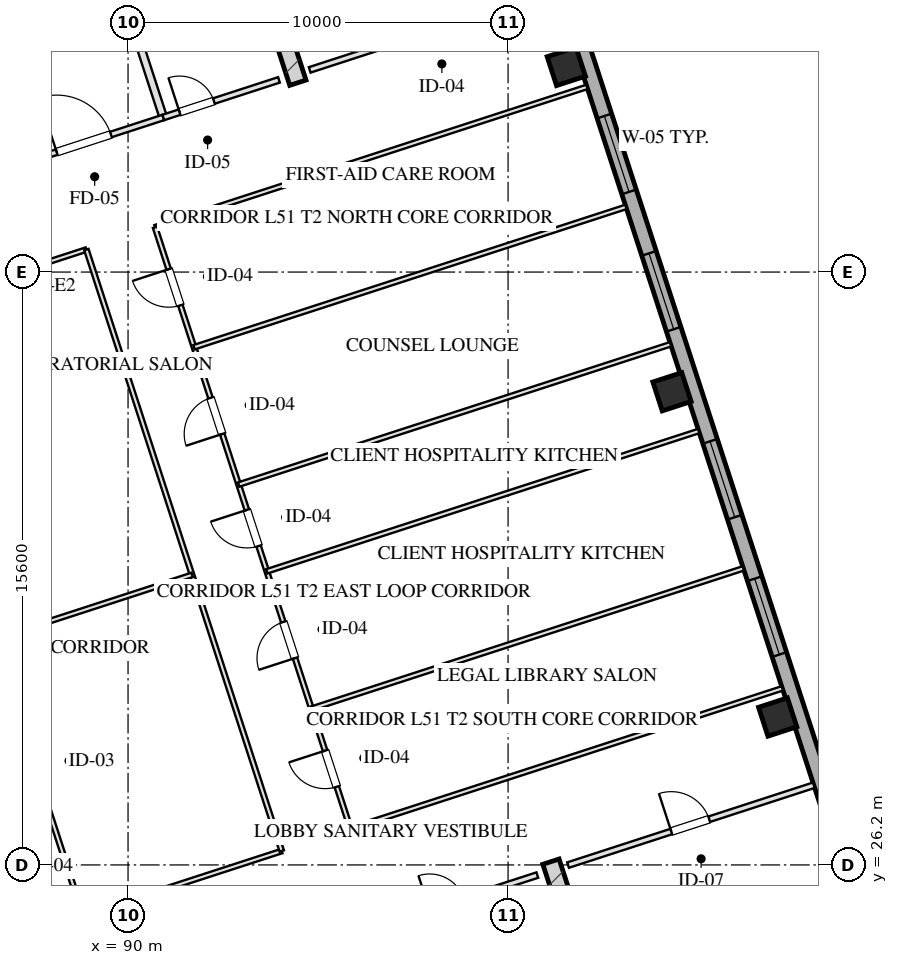
"""IFC4 building model, lengths in metres.
Left out: names, types, materials, properties, quantities, classifications, styles, units other than length and angle.
Written with IfcOpenShell. Run it as: python <this file> out.ifc"""

import sys

from ifc_helpers import new_model, si_unit, direction, frame, frame_2d, origin, origin_2d, place, context, subcontext, project, spatial, rectangle, hollow_rectangle, extrude, element, fill, save


model = new_model("IFC4")
c1 = context("Model", 3, precision=1e-05, world=origin(), true_north=direction((0.0, 1.0)))
c2 = subcontext(c1, "Body", "Model", "MODEL_VIEW")
j1 = project(units=[si_unit("LENGTHUNIT", "METRE"), si_unit("PLANEANGLEUNIT", "RADIAN")], contexts=[c1])
p1 = place(None, origin())
s1 = spatial("IfcSite", under=j1, at=p1, CompositionType="ELEMENT")
p2 = place(p1, origin())
s2 = spatial("IfcBuilding", under=s1, at=p2, CompositionType="ELEMENT")
p3 = place(p2, frame((0.0, 0.0, 192.05)))
s3 = spatial("IfcBuildingStorey", under=s2, at=p3, CompositionType="ELEMENT", Elevation=192.05)
for number, where, z_axis, x_axis in (
    (1, (101.128, 26.286, 0.0), (0.0, 0.0, 1.0), (0.309, -0.951, 0.0)),
    (2, (94.469, 46.781, 0.0), (0.0, 0.0, 1.0), (-0.309, 0.951, 0.0)),
):
    element("IfcWall", number, at=place(p3, frame(where, z_axis=z_axis, x_axis=x_axis)), inside=s3, PredefinedType="SHEAR", context=c2, shape_type="SweptSolid", body=[
        extrude(rectangle(XDim=9.33, YDim=0.45, at=frame_2d((4.665, 0.0))), origin(), (0.0, 0.0, 1.0), 3.45),
    ])
for number, where, z_axis, x_axis in (
    (3, (107.094, 30.091, 0.0), (0.0, 0.0, 1.0), (0.951, 0.309, 0.0)),
    (4, (104.313, 38.651, 0.0), (0.0, 0.0, 1.0), (0.951, 0.309, 0.0)),
    (5, (101.532, 47.21, 0.0), (0.0, 0.0, 1.0), (0.951, 0.309, 0.0)),
):
    element("IfcColumn", number, at=place(p3, frame(where, z_axis=z_axis, x_axis=x_axis)), inside=s3, PredefinedType="COLUMN", context=c2, shape_type="SweptSolid", body=[
        extrude(hollow_rectangle(XDim=0.8, YDim=0.8, WallThickness=0.028, at=origin_2d()), origin(), (0.0, 0.0, 1.0), 3.451),
    ])
p4 = place(p3, frame((98.224, 59.173, 0.0), z_axis=(0.0, 0.0, 1.0), x_axis=(0.309014228706, -0.951057414911, 0.0)))
e6 = element("IfcWall", 6, at=p4, inside=s3, PredefinedType="SOLIDWALL", context=c2, shape_type="SweptSolid", body=[
    extrude(rectangle(XDim=42.8, YDim=0.4, at=frame_2d((21.4, 0.0))), origin(), (0.0, 0.0, 1.0), 2.61),
])
p5 = place(p4, frame((26.75, 0.0, 0.75)))
e7 = element("IfcOpeningElement", 7, at=p5, cuts=e6, PredefinedType="OPENING", context=c2, shape_type="SweptSolid", body=[
    extrude(rectangle(XDim=2.1, YDim=1.46, at=frame_2d((1.05, 0.73))), frame((0.0, 0.21, 0.0), z_axis=(0.0, -1.0, 0.0), x_axis=(1.0, 0.0, 0.0)), (0.0, 0.0, 1.0), 0.42),
])
p6 = place(p4, frame((22.95, 0.0, 0.75)))
e8 = element("IfcOpeningElement", 8, at=p6, cuts=e6, PredefinedType="OPENING", context=c2, shape_type="SweptSolid", body=[
    extrude(rectangle(XDim=2.1, YDim=1.46, at=frame_2d((1.05, 0.73))), frame((0.0, 0.21, 0.0), z_axis=(0.0, -1.0, 0.0), x_axis=(1.0, 0.0, 0.0)), (0.0, 0.0, 1.0), 0.42),
])
p7 = place(p4, frame((17.75, 0.0, 0.75)))
e9 = element("IfcOpeningElement", 9, at=p7, cuts=e6, PredefinedType="OPENING", context=c2, shape_type="SweptSolid", body=[
    extrude(rectangle(XDim=2.1, YDim=1.46, at=frame_2d((1.05, 0.73))), frame((0.0, 0.21, 0.0), z_axis=(0.0, -1.0, 0.0), x_axis=(1.0, 0.0, 0.0)), (0.0, 0.0, 1.0), 0.42),
])
p8 = place(p4, frame((13.95, 0.0, 0.75)))
e10 = element("IfcOpeningElement", 10, at=p8, cuts=e6, PredefinedType="OPENING", context=c2, shape_type="SweptSolid", body=[
    extrude(rectangle(XDim=2.1, YDim=1.46, at=frame_2d((1.05, 0.73))), frame((0.0, 0.21, 0.0), z_axis=(0.0, -1.0, 0.0), x_axis=(1.0, 0.0, 0.0)), (0.0, 0.0, 1.0), 0.42),
])
p9 = place(p3, frame((97.727, 24.944, 0.0), z_axis=(0.0, 0.0, 1.0), x_axis=(0.951036872128, 0.309077446369, 0.0)))
e11 = element("IfcWall", 11, at=p9, inside=s3, PredefinedType="PARTITIONING", context=c2, shape_type="SweptSolid", body=[
    extrude(rectangle(XDim=3.2, YDim=0.15, at=frame_2d((1.6, 0.0))), origin(), (0.0, 0.0, 1.0), 3.175),
])
p10 = place(p9, frame((0.22, 0.0, 0.0)))
e12 = element("IfcOpeningElement", 12, at=p10, cuts=e11, PredefinedType="OPENING", context=c2, shape_type="SweptSolid", body=[
    extrude(rectangle(XDim=0.95, YDim=2.05, at=frame_2d((0.475, 1.025))), frame((0.0, 0.085, 0.0), z_axis=(0.0, -1.0, 0.0), x_axis=(1.0, 0.0, 0.0)), (0.0, 0.0, 1.0), 0.17),
])
p11 = place(p3, frame((90.928, 45.868, 0.0), z_axis=(0.0, 0.0, 1.0), x_axis=(-0.309042196757, 0.951048327176, 0.0)))
e13 = element("IfcWall", 13, at=p11, inside=s3, PredefinedType="PARTITIONING", context=c2, shape_type="SweptSolid", body=[
    extrude(rectangle(XDim=8.43, YDim=0.2, at=frame_2d((4.215, 0.0))), origin(), (0.0, 0.0, 1.0), 3.175),
])
p12 = place(p3, frame((86.743, 44.508, 0.0), z_axis=(0.0, 0.0, 1.0), x_axis=(0.951063829732, 0.308994485023, 0.0)))
e14 = element("IfcWall", 14, at=p12, inside=s3, PredefinedType="PARTITIONING", context=c2, shape_type="SweptSolid", body=[
    extrude(rectangle(XDim=4.4, YDim=0.15, at=frame_2d((2.2, 0.0))), origin(), (0.0, 0.0, 1.0), 3.175),
])
p13 = place(p12, frame((1.45, 0.0, 0.0)))
e15 = element("IfcOpeningElement", 15, at=p13, cuts=e14, PredefinedType="OPENING", context=c2, shape_type="SweptSolid", body=[
    extrude(rectangle(XDim=1.5, YDim=2.05, at=frame_2d((0.75, 1.025))), frame((0.0, 0.085, 0.0), z_axis=(0.0, -1.0, 0.0), x_axis=(1.0, 0.0, 0.0)), (0.0, 0.0, 1.0), 0.17),
])
p14 = place(p3, frame((85.718, 47.666, 0.0), z_axis=(0.0, 0.0, 1.0), x_axis=(0.951058531764, 0.30901079133, 0.0)))
e16 = element("IfcWall", 16, at=p14, inside=s3, PredefinedType="PARTITIONING", context=c2, shape_type="SweptSolid", body=[
    extrude(rectangle(XDim=4.4, YDim=0.2, at=frame_2d((2.2, 0.0))), origin(), (0.0, 0.0, 1.0), 3.175),
])
p15 = place(p14, frame((0.45, 0.0, 0.0)))
e17 = element("IfcOpeningElement", 17, at=p15, cuts=e16, PredefinedType="OPENING", context=c2, shape_type="SweptSolid", body=[
    extrude(rectangle(XDim=1.1, YDim=2.05, at=frame_2d((0.55, 1.025))), frame((0.0, 0.11, 0.0), z_axis=(0.0, -1.0, 0.0), x_axis=(1.0, 0.0, 0.0)), (0.0, 0.0, 1.0), 0.22),
])
p16 = place(p14, frame((2.55, 0.0, 0.0)))
e18 = element("IfcOpeningElement", 18, at=p16, cuts=e16, PredefinedType="OPENING", context=c2, shape_type="SweptSolid", body=[
    extrude(rectangle(XDim=1.1, YDim=2.05, at=frame_2d((0.55, 1.025))), frame((0.0, 0.11, 0.0), z_axis=(0.0, -1.0, 0.0), x_axis=(1.0, 0.0, 0.0)), (0.0, 0.0, 1.0), 0.22),
])
p17 = place(p3, frame((90.928, 45.868, 0.0), z_axis=(0.0, 0.0, 1.0), x_axis=(0.951059297078, 0.309008435874, 0.0)))
e19 = element("IfcWall", 19, at=p17, inside=s3, PredefinedType="PARTITIONING", context=c2, shape_type="SweptSolid", body=[
    extrude(rectangle(XDim=3.2, YDim=0.15, at=frame_2d((1.6, 0.0))), origin(), (0.0, 0.0, 1.0), 3.175),
])
p18 = place(p17, frame((0.45, 0.0, 0.0)))
e20 = element("IfcOpeningElement", 20, at=p18, cuts=e19, PredefinedType="OPENING", context=c2, shape_type="SweptSolid", body=[
    extrude(rectangle(XDim=0.95, YDim=2.05, at=frame_2d((0.475, 1.025))), frame((0.0, 0.085, 0.0), z_axis=(0.0, -1.0, 0.0), x_axis=(1.0, 0.0, 0.0)), (0.0, 0.0, 1.0), 0.17),
])
p19 = place(p3, frame((101.578, 26.196, 0.0), z_axis=(0.0, 0.0, 1.0), x_axis=(0.951064934653, 0.308991084134, 0.0)))
e21 = element("IfcWall", 21, at=p19, inside=s3, PredefinedType="PARTITIONING", context=c2, shape_type="SweptSolid", body=[
    extrude(rectangle(XDim=6.8, YDim=0.15, at=frame_2d((3.4, 0.0))), origin(), (0.0, 0.0, 1.0), 3.175),
])
p20 = place(p19, frame((2.856, 0.0, 0.0)))
e22 = element("IfcOpeningElement", 22, at=p20, cuts=e21, PredefinedType="OPENING", context=c2, shape_type="SweptSolid", body=[
    extrude(rectangle(XDim=1.05, YDim=2.05, at=frame_2d((0.525, 1.025))), frame((0.0, 0.085, 0.0), z_axis=(0.0, -1.0, 0.0), x_axis=(1.0, 0.0, 0.0)), (0.0, 0.0, 1.0), 0.17),
])
p21 = place(p3, frame((94.78, 47.119, 0.0), z_axis=(0.0, 0.0, 1.0), x_axis=(0.951057811516, 0.309013008068, 0.0)))
e23 = element("IfcWall", 23, at=p21, inside=s3, PredefinedType="PARTITIONING", context=c2, shape_type="SweptSolid", body=[
    extrude(rectangle(XDim=6.8, YDim=0.15, at=frame_2d((3.4, 0.0))), origin(), (0.0, 0.0, 1.0), 3.175),
])
p22 = place(p21, frame((2.856, 0.0, 0.0)))
e24 = element("IfcOpeningElement", 24, at=p22, cuts=e23, PredefinedType="OPENING", context=c2, shape_type="SweptSolid", body=[
    extrude(rectangle(XDim=1.0, YDim=2.05, at=frame_2d((0.5, 1.025))), frame((0.0, 0.085, 0.0), z_axis=(0.0, -1.0, 0.0), x_axis=(1.0, 0.0, 0.0)), (0.0, 0.0, 1.0), 0.17),
])
p23 = place(p3, frame((88.814, 24.867, 0.0), z_axis=(0.0, 0.0, 1.0), x_axis=(0.951061793147, 0.309000753423, 0.0)))
e25 = element("IfcWall", 25, at=p23, inside=s3, PredefinedType="PARTITIONING", context=c2, shape_type="SweptSolid", body=[
    extrude(rectangle(XDim=5.5, YDim=0.12, at=frame_2d((2.75, 0.0))), origin(), (0.0, 0.0, 1.0), 3.175),
])
p24 = place(p3, frame((95.852, 27.153, 0.0), z_axis=(0.0, 0.0, 1.0), x_axis=(0.951054485045, 0.30902324585, 0.0)))
e26 = element("IfcWall", 26, at=p24, inside=s3, PredefinedType="PARTITIONING", context=c2, shape_type="SweptSolid", body=[
    extrude(rectangle(XDim=11.95, YDim=0.12, at=frame_2d((5.975, 0.0))), origin(), (0.0, 0.0, 1.0), 3.175),
])
p25 = place(p3, frame((83.672, 40.692, 0.0), z_axis=(0.0, 0.0, 1.0), x_axis=(0.951048747115, 0.30904090443, 0.0)))
e27 = element("IfcWall", 27, at=p25, inside=s3, PredefinedType="PARTITIONING", context=c2, shape_type="SweptSolid", body=[
    extrude(rectangle(XDim=5.5, YDim=0.12, at=frame_2d((2.75, 0.0))), origin(), (0.0, 0.0, 1.0), 3.175),
])
p26 = place(p3, frame((90.71, 42.979, 0.0), z_axis=(0.0, 0.0, 1.0), x_axis=(0.95105853842, 0.309010770845, 0.0)))
e28 = element("IfcWall", 28, at=p26, inside=s3, PredefinedType="PARTITIONING", context=c2, shape_type="SweptSolid", body=[
    extrude(rectangle(XDim=11.95, YDim=0.12, at=frame_2d((5.975, 0.0))), origin(), (0.0, 0.0, 1.0), 3.175),
])
p27 = place(p3, frame((88.814, 24.867, 0.0), z_axis=(0.0, 0.0, 1.0), x_axis=(-0.309022042254, 0.951054876125, 0.0)))
e29 = element("IfcWall", 29, at=p27, inside=s3, PredefinedType="PARTITIONING", context=c2, shape_type="SweptSolid", body=[
    extrude(rectangle(XDim=16.64, YDim=0.12, at=frame_2d((8.32, 0.0))), origin(), (0.0, 0.0, 1.0), 3.175),
])
p28 = place(p27, frame((3.438, 0.0, 0.0)))
e30 = element("IfcOpeningElement", 30, at=p28, cuts=e29, PredefinedType="OPENING", context=c2, shape_type="SweptSolid", body=[
    extrude(rectangle(XDim=1.1, YDim=2.05, at=frame_2d((0.55, 1.025))), frame((0.0, 0.07, 0.0), z_axis=(0.0, -1.0, 0.0), x_axis=(1.0, 0.0, 0.0)), (0.0, 0.0, 1.0), 0.14),
])
p29 = place(p27, frame((11.69, 0.0, 0.0)))
e31 = element("IfcOpeningElement", 31, at=p29, cuts=e29, PredefinedType="OPENING", context=c2, shape_type="SweptSolid", body=[
    extrude(rectangle(XDim=1.1, YDim=2.05, at=frame_2d((0.55, 1.025))), frame((0.0, 0.07, 0.0), z_axis=(0.0, -1.0, 0.0), x_axis=(1.0, 0.0, 0.0)), (0.0, 0.0, 1.0), 0.14),
])
p30 = place(p3, frame((94.045, 26.566, 0.0), z_axis=(0.0, 0.0, 1.0), x_axis=(-0.30901773025, 0.951056277195, 0.0)))
e32 = element("IfcWall", 32, at=p30, inside=s3, PredefinedType="PARTITIONING", context=c2, shape_type="SweptSolid", body=[
    extrude(rectangle(XDim=16.64, YDim=0.12, at=frame_2d((8.32, 0.0))), origin(), (0.0, 0.0, 1.0), 3.175),
])
p31 = place(p3, frame((95.852, 27.153, 0.0), z_axis=(0.0, 0.0, 1.0), x_axis=(-0.309004459387, 0.951060589068, 0.0)))
e33 = element("IfcWall", 33, at=p31, inside=s3, PredefinedType="PARTITIONING", context=c2, shape_type="SweptSolid", body=[
    extrude(rectangle(XDim=16.64, YDim=0.12, at=frame_2d((8.32, 0.0))), origin(), (0.0, 0.0, 1.0), 3.175),
])
p32 = place(p31, frame((1.16, 0.0, 0.0)))
e34 = element("IfcOpeningElement", 34, at=p32, cuts=e33, PredefinedType="OPENING", context=c2, shape_type="SweptSolid", body=[
    extrude(rectangle(XDim=1.0, YDim=2.05, at=frame_2d((0.5, 1.025))), frame((0.0, 0.07, 0.0), z_axis=(0.0, -1.0, 0.0), x_axis=(1.0, 0.0, 0.0)), (0.0, 0.0, 1.0), 0.14),
])
p33 = place(p31, frame((4.72, 0.0, 0.0)))
e35 = element("IfcOpeningElement", 35, at=p33, cuts=e33, PredefinedType="OPENING", context=c2, shape_type="SweptSolid", body=[
    extrude(rectangle(XDim=1.0, YDim=2.05, at=frame_2d((0.5, 1.025))), frame((0.0, 0.07, 0.0), z_axis=(0.0, -1.0, 0.0), x_axis=(1.0, 0.0, 0.0)), (0.0, 0.0, 1.0), 0.14),
])
p34 = place(p31, frame((7.82, 0.0, 0.0)))
e36 = element("IfcOpeningElement", 36, at=p34, cuts=e33, PredefinedType="OPENING", context=c2, shape_type="SweptSolid", body=[
    extrude(rectangle(XDim=1.0, YDim=2.05, at=frame_2d((0.5, 1.025))), frame((0.0, 0.07, 0.0), z_axis=(0.0, -1.0, 0.0), x_axis=(1.0, 0.0, 0.0)), (0.0, 0.0, 1.0), 0.14),
])
p35 = place(p31, frame((10.92, 0.0, 0.0)))
e37 = element("IfcOpeningElement", 37, at=p35, cuts=e33, PredefinedType="OPENING", context=c2, shape_type="SweptSolid", body=[
    extrude(rectangle(XDim=1.0, YDim=2.05, at=frame_2d((0.5, 1.025))), frame((0.0, 0.07, 0.0), z_axis=(0.0, -1.0, 0.0), x_axis=(1.0, 0.0, 0.0)), (0.0, 0.0, 1.0), 0.14),
])
p36 = place(p31, frame((14.48, 0.0, 0.0)))
e38 = element("IfcOpeningElement", 38, at=p36, cuts=e33, PredefinedType="OPENING", context=c2, shape_type="SweptSolid", body=[
    extrude(rectangle(XDim=1.0, YDim=2.05, at=frame_2d((0.5, 1.025))), frame((0.0, 0.07, 0.0), z_axis=(0.0, -1.0, 0.0), x_axis=(1.0, 0.0, 0.0)), (0.0, 0.0, 1.0), 0.14),
])
p37 = place(p3, frame((86.453, 32.133, 0.0), z_axis=(0.0, 0.0, 1.0), x_axis=(0.951052986339, 0.309027858251, 0.0)))
e39 = element("IfcWall", 39, at=p37, inside=s3, PredefinedType="PARTITIONING", context=c2, shape_type="SweptSolid", body=[
    extrude(rectangle(XDim=5.5, YDim=0.12, at=frame_2d((2.75, 0.0))), origin(), (0.0, 0.0, 1.0), 3.175),
])
for number, where, z_axis, x_axis in (
    (40, (94.826, 30.311, 0.0), (0.0, 0.0, 1.0), (0.951, 0.309, 0.0)),
    (41, (93.652, 33.925, 0.0), (0.0, 0.0, 1.0), (0.951, 0.309, 0.0)),
):
    element("IfcWall", number, at=place(p3, frame(where, z_axis=z_axis, x_axis=x_axis)), inside=s3, PredefinedType="PARTITIONING", context=c2, shape_type="SweptSolid", body=[
        extrude(rectangle(XDim=11.95, YDim=0.12, at=frame_2d((5.975, 0.0))), origin(), (0.0, 0.0, 1.0), 3.175),
    ])
for number, where, z_axis, x_axis in (
    (42, (92.91, 36.207, 0.0), (0.0, 0.0, 1.0), (0.951, 0.309, 0.0)),
    (43, (91.736, 39.821, 0.0), (0.0, 0.0, 1.0), (0.951, 0.309, 0.0)),
):
    element("IfcWall", number, at=place(p3, frame(where, z_axis=z_axis, x_axis=x_axis)), inside=s3, PredefinedType="PARTITIONING", context=c2, shape_type="SweptSolid", body=[
        extrude(rectangle(XDim=11.95, YDim=0.12, at=frame_2d((5.975, 0.0))), origin(), (0.0, 0.0, 1.0), 3.175),
    ])
p38 = place(p5, origin())
e44 = element("IfcWindow", 44, at=p38, inside=s3, PartitioningType="TRIPLE_PANEL_VERTICAL", PredefinedType="WINDOW", context=c2, shape_type="SweptSolid", body=[
    extrude(rectangle(XDim=2.1, YDim=1.46, at=frame_2d((1.05, 0.73))), frame((0.0, 0.03, 0.0), z_axis=(0.0, -1.0, 0.0), x_axis=(1.0, 0.0, 0.0)), (0.0, 0.0, 1.0), 0.06),
])
fill(e7, e44)
p39 = place(p6, origin())
e45 = element("IfcWindow", 45, at=p39, inside=s3, PartitioningType="TRIPLE_PANEL_VERTICAL", PredefinedType="WINDOW", context=c2, shape_type="SweptSolid", body=[
    extrude(rectangle(XDim=2.1, YDim=1.46, at=frame_2d((1.05, 0.73))), frame((0.0, 0.03, 0.0), z_axis=(0.0, -1.0, 0.0), x_axis=(1.0, 0.0, 0.0)), (0.0, 0.0, 1.0), 0.06),
])
fill(e8, e45)
p40 = place(p7, origin())
e46 = element("IfcWindow", 46, at=p40, inside=s3, PartitioningType="TRIPLE_PANEL_VERTICAL", PredefinedType="WINDOW", context=c2, shape_type="SweptSolid", body=[
    extrude(rectangle(XDim=2.1, YDim=1.46, at=frame_2d((1.05, 0.73))), frame((0.0, 0.03, 0.0), z_axis=(0.0, -1.0, 0.0), x_axis=(1.0, 0.0, 0.0)), (0.0, 0.0, 1.0), 0.06),
])
fill(e9, e46)
p41 = place(p8, origin())
e47 = element("IfcWindow", 47, at=p41, inside=s3, PartitioningType="TRIPLE_PANEL_VERTICAL", PredefinedType="WINDOW", context=c2, shape_type="SweptSolid", body=[
    extrude(rectangle(XDim=2.1, YDim=1.46, at=frame_2d((1.05, 0.73))), frame((0.0, 0.03, 0.0), z_axis=(0.0, -1.0, 0.0), x_axis=(1.0, 0.0, 0.0)), (0.0, 0.0, 1.0), 0.06),
])
fill(e10, e47)
p42 = place(p13, origin())
e48 = element("IfcDoor", 48, at=p42, inside=s3, OperationType="SINGLE_SWING_LEFT", PredefinedType="DOOR", context=c2, shape_type="SweptSolid", body=[
    extrude(rectangle(XDim=1.5, YDim=2.05, at=frame_2d((0.75, 1.025))), frame((0.0, 0.025, 0.0), z_axis=(0.0, -1.0, 0.0), x_axis=(1.0, 0.0, 0.0)), (0.0, 0.0, 1.0), 0.05),
])
fill(e15, e48)
p43 = place(p18, origin())
e49 = element("IfcDoor", 49, at=p43, inside=s3, OperationType="SINGLE_SWING_LEFT", PredefinedType="DOOR", context=c2, shape_type="SweptSolid", body=[
    extrude(rectangle(XDim=0.95, YDim=2.05, at=frame_2d((0.475, 1.025))), frame((0.0, 0.025, 0.0), z_axis=(0.0, -1.0, 0.0), x_axis=(1.0, 0.0, 0.0)), (0.0, 0.0, 1.0), 0.05),
])
fill(e20, e49)
p44 = place(p20, origin())
e50 = element("IfcDoor", 50, at=p44, inside=s3, OperationType="SINGLE_SWING_LEFT", PredefinedType="DOOR", context=c2, shape_type="SweptSolid", body=[
    extrude(rectangle(XDim=1.05, YDim=2.05, at=frame_2d((0.525, 1.025))), frame((0.0, 0.025, 0.0), z_axis=(0.0, -1.0, 0.0), x_axis=(1.0, 0.0, 0.0)), (0.0, 0.0, 1.0), 0.05),
])
fill(e22, e50)
p45 = place(p32, origin())
e51 = element("IfcDoor", 51, at=p45, inside=s3, OperationType="SINGLE_SWING_RIGHT", PredefinedType="DOOR", context=c2, shape_type="SweptSolid", body=[
    extrude(rectangle(XDim=1.0, YDim=2.05, at=frame_2d((0.5, 1.025))), frame((0.0, 0.025, 0.0), z_axis=(0.0, -1.0, 0.0), x_axis=(1.0, 0.0, 0.0)), (0.0, 0.0, 1.0), 0.05),
])
fill(e34, e51)
p46 = place(p33, origin())
e52 = element("IfcDoor", 52, at=p46, inside=s3, OperationType="SINGLE_SWING_LEFT", PredefinedType="DOOR", context=c2, shape_type="SweptSolid", body=[
    extrude(rectangle(XDim=1.0, YDim=2.05, at=frame_2d((0.5, 1.025))), frame((0.0, 0.025, 0.0), z_axis=(0.0, -1.0, 0.0), x_axis=(1.0, 0.0, 0.0)), (0.0, 0.0, 1.0), 0.05),
])
fill(e35, e52)
p47 = place(p34, origin())
e53 = element("IfcDoor", 53, at=p47, inside=s3, OperationType="SINGLE_SWING_RIGHT", PredefinedType="DOOR", context=c2, shape_type="SweptSolid", body=[
    extrude(rectangle(XDim=1.0, YDim=2.05, at=frame_2d((0.5, 1.025))), frame((0.0, 0.025, 0.0), z_axis=(0.0, -1.0, 0.0), x_axis=(1.0, 0.0, 0.0)), (0.0, 0.0, 1.0), 0.05),
])
fill(e36, e53)
p48 = place(p35, origin())
e54 = element("IfcDoor", 54, at=p48, inside=s3, OperationType="SINGLE_SWING_LEFT", PredefinedType="DOOR", context=c2, shape_type="SweptSolid", body=[
    extrude(rectangle(XDim=1.0, YDim=2.05, at=frame_2d((0.5, 1.025))), frame((0.0, 0.025, 0.0), z_axis=(0.0, -1.0, 0.0), x_axis=(1.0, 0.0, 0.0)), (0.0, 0.0, 1.0), 0.05),
])
fill(e37, e54)
p49 = place(p36, origin())
e55 = element("IfcDoor", 55, at=p49, inside=s3, OperationType="SINGLE_SWING_RIGHT", PredefinedType="DOOR", context=c2, shape_type="SweptSolid", body=[
    extrude(rectangle(XDim=1.0, YDim=2.05, at=frame_2d((0.5, 1.025))), frame((0.0, 0.025, 0.0), z_axis=(0.0, -1.0, 0.0), x_axis=(1.0, 0.0, 0.0)), (0.0, 0.0, 1.0), 0.05),
])
fill(e38, e55)
save(model, sys.argv[1])
